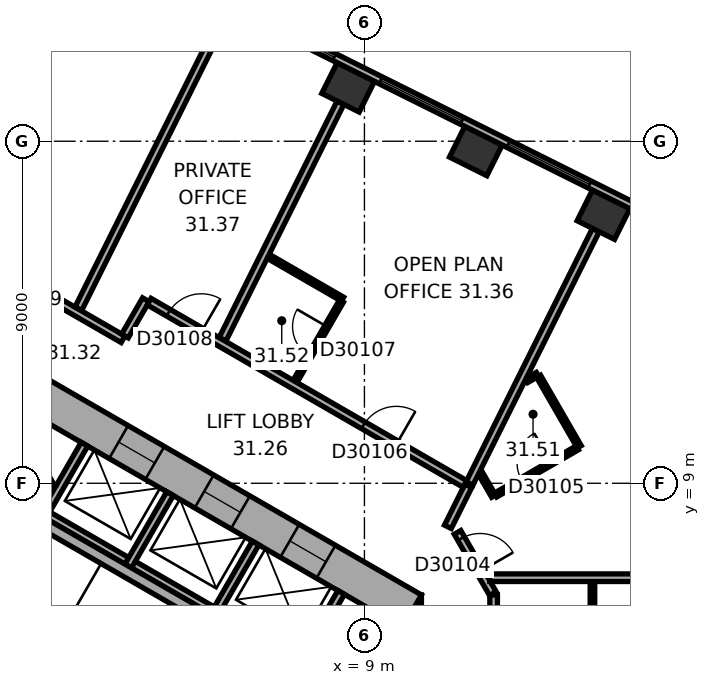
"""IFC4 building model, lengths in metres.
Left out: names, types, materials, properties, quantities, classifications, styles, units other than length and angle.
Written with IfcOpenShell. Run it as: python <this file> out.ifc"""

import sys

from ifc_helpers import new_model, si_unit, direction, frame, frame_2d, origin, origin_2d, place, context, subcontext, project, spatial, rectangle, extrude, element, fill, save


model = new_model("IFC4")
c1 = context("Model", 3, precision=1e-05, world=origin(), true_north=direction((0.0, 1.0)))
c2 = subcontext(c1, "Body", "Model", "MODEL_VIEW")
j1 = project(units=[si_unit("LENGTHUNIT", "METRE"), si_unit("PLANEANGLEUNIT", "RADIAN")], contexts=[c1])
p1 = place(None, origin())
s1 = spatial("IfcSite", under=j1, at=p1, CompositionType="ELEMENT")
p2 = place(p1, origin())
s2 = spatial("IfcBuilding", under=s1, at=p2, CompositionType="ELEMENT")
p3 = place(p2, frame((0.0, 0.0, 128.1)))
s3 = spatial("IfcBuildingStorey", under=s2, at=p3, CompositionType="ELEMENT", Elevation=128.1)
for number, where, z_axis, x_axis in (
    (1, (15.29, 16.065, 0.0), (0.0, 0.0, 1.0), (-0.895, 0.446, 0.0)),
    (2, (11.931, 17.74, 0.0), (0.0, 0.0, 1.0), (-0.895, 0.446, 0.0)),
    (3, (8.571, 19.416, 0.0), (0.0, 0.0, 1.0), (-0.895, 0.446, 0.0)),
):
    element("IfcColumn", number, at=place(p3, frame(where, z_axis=z_axis, x_axis=x_axis)), inside=s3, PredefinedType="COLUMN", context=c2, shape_type="SweptSolid", body=[
        extrude(rectangle(XDim=1.1, YDim=0.9, at=origin_2d()), origin(), (0.0, 0.0, 1.0), 3.7),
    ])
p4 = place(p3, frame((10.0, -6.062, 0.0), z_axis=(0.0, 0.0, 1.0), x_axis=(0.0, 1.0, 0.0)))
e4 = element("IfcWall", 4, at=p4, inside=s3, PredefinedType="SHEAR", context=c2, shape_type="SweptSolid", body=[
    extrude(rectangle(XDim=12.125, YDim=1.0, at=frame_2d((6.062, 0.0))), origin(), (0.0, 0.0, 1.0), 3.7),
])
p5 = place(p4, frame((6.262, 0.0, 0.0)))
e5 = element("IfcOpeningElement", 5, at=p5, cuts=e4, PredefinedType="OPENING", context=c2, shape_type="SweptSolid", body=[
    extrude(rectangle(XDim=1.5, YDim=2.1, at=frame_2d((0.75, 1.05))), frame((0.0, 0.51, 0.0), z_axis=(0.0, -1.0, 0.0), x_axis=(1.0, 0.0, 0.0)), (0.0, 0.0, 1.0), 1.02),
])
p6 = place(p4, frame((1.712, 0.0, 0.0)))
e6 = element("IfcOpeningElement", 6, at=p6, cuts=e4, PredefinedType="OPENING", context=c2, shape_type="SweptSolid", body=[
    extrude(rectangle(XDim=1.1, YDim=2.1, at=frame_2d((0.55, 1.05))), frame((0.0, 0.51, 0.0), z_axis=(0.0, -1.0, 0.0), x_axis=(1.0, 0.0, 0.0)), (0.0, 0.0, 1.0), 1.02),
])
p7 = place(p4, frame((4.312, 0.0, 0.0)))
e7 = element("IfcOpeningElement", 7, at=p7, cuts=e4, PredefinedType="OPENING", context=c2, shape_type="SweptSolid", body=[
    extrude(rectangle(XDim=1.1, YDim=2.1, at=frame_2d((0.55, 1.05))), frame((0.0, 0.51, 0.0), z_axis=(0.0, -1.0, 0.0), x_axis=(1.0, 0.0, 0.0)), (0.0, 0.0, 1.0), 1.02),
])
p8 = place(p3, frame((10.25, 5.629, 0.0), z_axis=(0.0, 0.0, 1.0), x_axis=(-0.866022616891, 0.50000482701, 0.0)))
e8 = element("IfcWall", 8, at=p8, inside=s3, PredefinedType="SHEAR", context=c2, shape_type="SweptSolid", body=[
    extrude(rectangle(XDim=12.125, YDim=1.0, at=frame_2d((6.062, 0.0))), origin(), (0.0, 0.0, 1.0), 3.7),
])
p9 = place(p8, frame((2.612, 0.0, 0.0)))
e9 = element("IfcOpeningElement", 9, at=p9, cuts=e8, PredefinedType="OPENING", context=c2, shape_type="SweptSolid", body=[
    extrude(rectangle(XDim=1.1, YDim=2.1, at=frame_2d((0.55, 1.05))), frame((0.0, 0.51, 0.0), z_axis=(0.0, -1.0, 0.0), x_axis=(1.0, 0.0, 0.0)), (0.0, 0.0, 1.0), 1.02),
])
p10 = place(p8, frame((5.212, 0.0, 0.0)))
e10 = element("IfcOpeningElement", 10, at=p10, cuts=e8, PredefinedType="OPENING", context=c2, shape_type="SweptSolid", body=[
    extrude(rectangle(XDim=1.1, YDim=2.1, at=frame_2d((0.55, 1.05))), frame((0.0, 0.51, 0.0), z_axis=(0.0, -1.0, 0.0), x_axis=(1.0, 0.0, 0.0)), (0.0, 0.0, 1.0), 1.02),
])
p11 = place(p8, frame((7.812, 0.0, 0.0)))
e11 = element("IfcOpeningElement", 11, at=p11, cuts=e8, PredefinedType="OPENING", context=c2, shape_type="SweptSolid", body=[
    extrude(rectangle(XDim=1.1, YDim=2.1, at=frame_2d((0.55, 1.05))), frame((0.0, 0.51, 0.0), z_axis=(0.0, -1.0, 0.0), x_axis=(1.0, 0.0, 0.0)), (0.0, 0.0, 1.0), 1.02),
])
p12 = place(p3, frame((19.464, 14.599, 0.0), z_axis=(0.0, 0.0, 1.0), x_axis=(-0.894935755043, 0.446195018289, 0.0)))
e12 = element("IfcWall", 12, at=p12, inside=s3, PredefinedType="STANDARD", context=c2, shape_type="SweptSolid", body=[
    extrude(rectangle(XDim=20.044, YDim=0.2, at=frame_2d((10.022, 0.0))), origin(), (0.0, 0.0, 1.0), 3.7),
])
p13 = place(p12, frame((1.313, 0.0, 0.9)))
e13 = element("IfcOpeningElement", 13, at=p13, cuts=e12, PredefinedType="OPENING", context=c2, shape_type="SweptSolid", body=[
    extrude(rectangle(XDim=2.4, YDim=2.0, at=frame_2d((1.2, 1.0))), frame((0.0, 0.11, 0.0), z_axis=(0.0, -1.0, 0.0), x_axis=(1.0, 0.0, 0.0)), (0.0, 0.0, 1.0), 0.22),
])
p14 = place(p12, frame((5.067, 0.0, 0.9)))
e14 = element("IfcOpeningElement", 14, at=p14, cuts=e12, PredefinedType="OPENING", context=c2, shape_type="SweptSolid", body=[
    extrude(rectangle(XDim=2.4, YDim=2.0, at=frame_2d((1.2, 1.0))), frame((0.0, 0.11, 0.0), z_axis=(0.0, -1.0, 0.0), x_axis=(1.0, 0.0, 0.0)), (0.0, 0.0, 1.0), 0.22),
])
p15 = place(p12, frame((8.821, 0.0, 0.9)))
e15 = element("IfcOpeningElement", 15, at=p15, cuts=e12, PredefinedType="OPENING", context=c2, shape_type="SweptSolid", body=[
    extrude(rectangle(XDim=2.4, YDim=2.0, at=frame_2d((1.2, 1.0))), frame((0.0, 0.11, 0.0), z_axis=(0.0, -1.0, 0.0), x_axis=(1.0, 0.0, 0.0)), (0.0, 0.0, 1.0), 0.22),
])
p16 = place(p12, frame((12.575, 0.0, 0.9)))
e16 = element("IfcOpeningElement", 16, at=p16, cuts=e12, PredefinedType="OPENING", context=c2, shape_type="SweptSolid", body=[
    extrude(rectangle(XDim=2.4, YDim=2.0, at=frame_2d((1.2, 1.0))), frame((0.0, 0.11, 0.0), z_axis=(0.0, -1.0, 0.0), x_axis=(1.0, 0.0, 0.0)), (0.0, 0.0, 1.0), 0.22),
])
p17 = place(p12, frame((16.329, 0.0, 0.9)))
e17 = element("IfcOpeningElement", 17, at=p17, cuts=e12, PredefinedType="OPENING", context=c2, shape_type="SweptSolid", body=[
    extrude(rectangle(XDim=2.4, YDim=2.0, at=frame_2d((1.2, 1.0))), frame((0.0, 0.11, 0.0), z_axis=(0.0, -1.0, 0.0), x_axis=(1.0, 0.0, 0.0)), (0.0, 0.0, 1.0), 0.22),
])
p18 = place(p3, frame((7.424, 4.259, 0.0), z_axis=(0.0, 0.0, 1.0), x_axis=(-0.866026010844, 0.49999894854, 0.0)))
e18 = element("IfcWall", 18, at=p18, inside=s3, PredefinedType="PARTITIONING", context=c2, shape_type="SweptSolid", body=[
    extrude(rectangle(XDim=8.0, YDim=0.2, at=frame_2d((4.0, 0.0))), origin(), (0.0, 0.0, 1.0), 3.42),
])
for number, where, z_axis, x_axis in (
    (19, (7.287, 4.222, 0.0), (0.0, 0.0, 1.0), (0.5, 0.866, 0.0)),
    (20, (5.036, 5.522, 0.0), (0.0, 0.0, 1.0), (0.5, 0.866, 0.0)),
    (21, (2.784, 6.822, 0.0), (0.0, 0.0, 1.0), (0.5, 0.866, 0.0)),
    (22, (0.532, 8.122, 0.0), (0.0, 0.0, 1.0), (0.5, 0.866, 0.0)),
):
    element("IfcWall", number, at=place(p3, frame(where, z_axis=z_axis, x_axis=x_axis)), inside=s3, PredefinedType="PARTITIONING", context=c2, shape_type="SweptSolid", body=[
        extrude(rectangle(XDim=2.2, YDim=0.2, at=frame_2d((1.1, 0.0))), origin(), (0.0, 0.0, 1.0), 3.42),
    ])
p19 = place(p3, frame((0.803, 9.009, 0.0), z_axis=(0.0, 0.0, 1.0), x_axis=(-0.866028230842, -0.499995103361, 0.0)))
e23 = element("IfcWall", 23, at=p19, inside=s3, PredefinedType="PARTITIONING", context=c2, shape_type="SweptSolid", body=[
    extrude(rectangle(XDim=5.4, YDim=0.2, at=frame_2d((2.7, 0.0))), origin(), (0.0, 0.0, 1.0), 3.42),
])
p20 = place(p3, frame((0.767, 8.872, 0.0), z_axis=(0.0, 0.0, 1.0), x_axis=(-0.499994660107, 0.866028486751, 0.0)))
e24 = element("IfcWall", 24, at=p20, inside=s3, PredefinedType="PARTITIONING", context=c2, shape_type="SweptSolid", body=[
    extrude(rectangle(XDim=2.2, YDim=0.2, at=frame_2d((1.1, 0.0))), origin(), (0.0, 0.0, 1.0), 3.42),
])
p21 = place(p3, frame((6.303, 4.617, 0.0), z_axis=(0.0, 0.0, 1.0), x_axis=(-0.866027801685, 0.499995846692, 0.0)))
e25 = element("IfcWall", 25, at=p21, inside=s3, PredefinedType="SHEAR", context=c2, shape_type="SweptSolid", body=[
    extrude(rectangle(XDim=7.06, YDim=0.3, at=frame_2d((3.53, 0.0))), origin(), (0.0, 0.0, 1.0), 3.42),
])
p22 = place(p3, frame((0.95, 13.77, 0.0), z_axis=(0.0, 0.0, 1.0), x_axis=(-1.0, 0.0, 0.0)))
e26 = element("IfcWall", 26, at=p22, inside=s3, PredefinedType="PARTITIONING", context=c2, shape_type="SweptSolid", body=[
    extrude(rectangle(XDim=1.86, YDim=0.2, at=frame_2d((0.93, 0.0))), origin(), (0.0, 0.0, 1.0), 3.42),
])
p23 = place(p22, frame((0.43, 0.0, 0.0)))
e27 = element("IfcOpeningElement", 27, at=p23, cuts=e26, PredefinedType="OPENING", context=c2, shape_type="SweptSolid", body=[
    extrude(rectangle(XDim=1.0, YDim=2.1, at=frame_2d((0.5, 1.05))), frame((0.0, 0.11, 0.0), z_axis=(0.0, -1.0, 0.0), x_axis=(1.0, 0.0, 0.0)), (0.0, 0.0, 1.0), 0.22),
])
p24 = place(p3, frame((2.648, 12.789, 0.0), z_axis=(0.0, 0.0, 1.0), x_axis=(-0.8660607342, 0.499938800931, 0.0)))
e28 = element("IfcWall", 28, at=p24, inside=s3, PredefinedType="PARTITIONING", context=c2, shape_type="SweptSolid", body=[
    extrude(rectangle(XDim=1.921, YDim=0.2, at=frame_2d((0.96, 0.0))), origin(), (0.0, 0.0, 1.0), 3.42),
])
p25 = place(p3, frame((3.249, 13.829, 0.0), z_axis=(0.0, 0.0, 1.0), x_axis=(-0.499812034598, -0.866133898465, 0.0)))
e29 = element("IfcWall", 29, at=p25, inside=s3, PredefinedType="PARTITIONING", context=c2, shape_type="SweptSolid", body=[
    extrude(rectangle(XDim=1.101, YDim=0.2, at=frame_2d((0.551, 0.0))), origin(), (0.0, 0.0, 1.0), 3.42),
])
p26 = place(p3, frame((5.01, 20.688, 0.0), z_axis=(0.0, 0.0, 1.0), x_axis=(-0.446203062394, -0.894931744386, 0.0)))
e30 = element("IfcWall", 30, at=p26, inside=s3, PredefinedType="PARTITIONING", context=c2, shape_type="SweptSolid", body=[
    extrude(rectangle(XDim=7.927, YDim=0.2, at=frame_2d((3.963, 0.0))), origin(), (0.0, 0.0, 1.0), 2.87),
])
p27 = place(p3, frame((6.468, 14.973, 0.0), z_axis=(0.0, 0.0, 1.0), x_axis=(0.865993004593, -0.500056112848, 0.0)))
e31 = element("IfcWall", 31, at=p27, inside=s3, PredefinedType="PARTITIONING", context=c2, shape_type="SweptSolid", body=[
    extrude(rectangle(XDim=2.259, YDim=0.12, at=frame_2d((1.129, 0.0))), origin(), (0.0, 0.0, 1.0), 3.42),
])
p28 = place(p3, frame((8.37, 19.013, 0.0), z_axis=(0.0, 0.0, 1.0), x_axis=(-0.446187985757, -0.894939261272, 0.0)))
e32 = element("IfcWall", 32, at=p28, inside=s3, PredefinedType="PARTITIONING", context=c2, shape_type="SweptSolid", body=[
    extrude(rectangle(XDim=6.953, YDim=0.2, at=frame_2d((3.477, 0.0))), origin(), (0.0, 0.0, 1.0), 3.42),
])
p29 = place(p3, frame((8.394, 13.792, 0.0), z_axis=(0.0, 0.0, 1.0), x_axis=(-0.500002508028, -0.866023955769, 0.0)))
e33 = element("IfcWall", 33, at=p29, inside=s3, PredefinedType="PARTITIONING", context=c2, shape_type="SweptSolid", body=[
    extrude(rectangle(XDim=2.44, YDim=0.12, at=frame_2d((1.22, 0.0))), origin(), (0.0, 0.0, 1.0), 3.42),
])
p30 = place(p29, frame((0.77, 0.0, 0.0)))
e34 = element("IfcOpeningElement", 34, at=p30, cuts=e33, PredefinedType="OPENING", context=c2, shape_type="SweptSolid", body=[
    extrude(rectangle(XDim=0.9, YDim=2.1, at=frame_2d((0.45, 1.05))), frame((0.0, 0.07, 0.0), z_axis=(0.0, -1.0, 0.0), x_axis=(1.0, 0.0, 0.0)), (0.0, 0.0, 1.0), 0.14),
])
p31 = place(p3, frame((11.196, 7.854, 0.0), z_axis=(0.0, 0.0, 1.0), x_axis=(0.446241040303, 0.894912808015, 0.0)))
e35 = element("IfcWall", 35, at=p31, inside=s3, PredefinedType="PARTITIONING", context=c2, shape_type="SweptSolid", body=[
    extrude(rectangle(XDim=1.205, YDim=0.2, at=frame_2d((0.603, 0.0))), origin(), (0.0, 0.0, 1.0), 3.42),
])
p32 = place(p3, frame((11.646, 8.981, 0.0), z_axis=(0.0, 0.0, 1.0), x_axis=(-0.866027142779, 0.499996987961, 0.0)))
e36 = element("IfcWall", 36, at=p32, inside=s3, PredefinedType="PARTITIONING", context=c2, shape_type="SweptSolid", body=[
    extrude(rectangle(XDim=9.597, YDim=0.2, at=frame_2d((4.798, 0.0))), origin(), (0.0, 0.0, 1.0), 3.42),
])
p33 = place(p32, frame((2.086, 0.0, 0.0)))
e37 = element("IfcOpeningElement", 37, at=p33, cuts=e36, PredefinedType="OPENING", context=c2, shape_type="SweptSolid", body=[
    extrude(rectangle(XDim=1.0, YDim=2.1, at=frame_2d((0.5, 1.05))), frame((0.0, 0.11, 0.0), z_axis=(0.0, -1.0, 0.0), x_axis=(1.0, 0.0, 0.0)), (0.0, 0.0, 1.0), 0.22),
])
p34 = place(p32, frame((8.01, 0.0, 0.0)))
e38 = element("IfcOpeningElement", 38, at=p34, cuts=e36, PredefinedType="OPENING", context=c2, shape_type="SweptSolid", body=[
    extrude(rectangle(XDim=1.0, YDim=2.1, at=frame_2d((0.5, 1.05))), frame((0.0, 0.11, 0.0), z_axis=(0.0, -1.0, 0.0), x_axis=(1.0, 0.0, 0.0)), (0.0, 0.0, 1.0), 0.22),
])
p35 = place(p3, frame((12.38, 6.097, 0.0), z_axis=(0.0, 0.0, 1.0), x_axis=(-0.499964847546, 0.866045698112, 0.0)))
e39 = element("IfcWall", 39, at=p35, inside=s3, PredefinedType="PARTITIONING", context=c2, shape_type="SweptSolid", body=[
    extrude(rectangle(XDim=1.86, YDim=0.2, at=frame_2d((0.93, 0.0))), origin(), (0.0, 0.0, 1.0), 3.42),
])
p36 = place(p35, frame((0.672, 0.0, 0.0)))
e40 = element("IfcOpeningElement", 40, at=p36, cuts=e39, PredefinedType="OPENING", context=c2, shape_type="SweptSolid", body=[
    extrude(rectangle(XDim=1.0, YDim=2.1, at=frame_2d((0.5, 1.05))), frame((0.0, 0.11, 0.0), z_axis=(0.0, -1.0, 0.0), x_axis=(1.0, 0.0, 0.0)), (0.0, 0.0, 1.0), 0.22),
])
p37 = place(p3, frame((12.4, 0.201, 0.0), z_axis=(0.0, 0.0, 1.0), x_axis=(0.0, 1.0, 0.0)))
e41 = element("IfcWall", 41, at=p37, inside=s3, PredefinedType="PARTITIONING", context=c2, shape_type="SweptSolid", body=[
    extrude(rectangle(XDim=5.861, YDim=0.2, at=frame_2d((2.931, 0.0))), origin(), (0.0, 0.0, 1.0), 3.42),
])
p38 = place(p37, frame((1.306, 0.0, 0.0)))
e42 = element("IfcOpeningElement", 42, at=p38, cuts=e41, PredefinedType="OPENING", context=c2, shape_type="SweptSolid", body=[
    extrude(rectangle(XDim=1.0, YDim=2.1, at=frame_2d((0.5, 1.05))), frame((0.0, 0.11, 0.0), z_axis=(0.0, -1.0, 0.0), x_axis=(1.0, 0.0, 0.0)), (0.0, 0.0, 1.0), 0.22),
])
p39 = place(p3, frame((12.401, 8.661, 0.0), z_axis=(0.0, 0.0, 1.0), x_axis=(-0.499831418649, 0.866122712398, 0.0)))
e43 = element("IfcWall", 43, at=p39, inside=s3, PredefinedType="PARTITIONING", context=c2, shape_type="SweptSolid", body=[
    extrude(rectangle(XDim=0.711, YDim=0.12, at=frame_2d((0.355, 0.0))), origin(), (0.0, 0.0, 1.0), 3.42),
])
p40 = place(p3, frame((13.269, 11.702, 0.0), z_axis=(0.0, 0.0, 1.0), x_axis=(0.865936922628, 0.500153222552, 0.0)))
e44 = element("IfcWall", 44, at=p40, inside=s3, PredefinedType="PARTITIONING", context=c2, shape_type="SweptSolid", body=[
    extrude(rectangle(XDim=0.327, YDim=0.12, at=frame_2d((0.164, 0.0))), origin(), (0.0, 0.0, 1.0), 3.42),
])
p41 = place(p3, frame((13.583, 11.814, 0.0), z_axis=(0.0, 0.0, 1.0), x_axis=(0.500028586798, -0.86600889856, 0.0)))
e45 = element("IfcWall", 45, at=p41, inside=s3, PredefinedType="PARTITIONING", context=c2, shape_type="SweptSolid", body=[
    extrude(rectangle(XDim=2.14, YDim=0.12, at=frame_2d((1.07, 0.0))), origin(), (0.0, 0.0, 1.0), 3.42),
])
p42 = place(p3, frame((14.601, 9.931, 0.0), z_axis=(0.0, 0.0, 1.0), x_axis=(-0.866023285932, -0.50000366821, 0.0)))
e46 = element("IfcWall", 46, at=p42, inside=s3, PredefinedType="PARTITIONING", context=c2, shape_type="SweptSolid", body=[
    extrude(rectangle(XDim=2.48, YDim=0.12, at=frame_2d((1.24, 0.0))), origin(), (0.0, 0.0, 1.0), 3.42),
])
p43 = place(p42, frame((0.79, 0.0, 0.0)))
e47 = element("IfcOpeningElement", 47, at=p43, cuts=e46, PredefinedType="OPENING", context=c2, shape_type="SweptSolid", body=[
    extrude(rectangle(XDim=0.9, YDim=2.1, at=frame_2d((0.45, 1.05))), frame((0.0, 0.07, 0.0), z_axis=(0.0, -1.0, 0.0), x_axis=(1.0, 0.0, 0.0)), (0.0, 0.0, 1.0), 0.14),
])
p44 = place(p3, frame((15.0, 6.415, 0.0), z_axis=(0.0, 0.0, 1.0), x_axis=(0.0, -1.0, 0.0)))
e48 = element("IfcWall", 48, at=p44, inside=s3, PredefinedType="PARTITIONING", context=c2, shape_type="SweptSolid", body=[
    extrude(rectangle(XDim=2.493, YDim=0.12, at=frame_2d((1.247, 0.0))), origin(), (0.0, 0.0, 1.0), 3.42),
])
p45 = place(p3, frame((15.09, 15.663, 0.0), z_axis=(0.0, 0.0, 1.0), x_axis=(-0.446203977428, -0.89493128816, 0.0)))
e49 = element("IfcWall", 49, at=p45, inside=s3, PredefinedType="PARTITIONING", context=c2, shape_type="SweptSolid", body=[
    extrude(rectangle(XDim=7.45, YDim=0.2, at=frame_2d((3.725, 0.0))), origin(), (0.0, 0.0, 1.0), 3.42),
])
p46 = place(p3, frame((20.75, 6.515, 0.0), z_axis=(0.0, 0.0, 1.0), x_axis=(-1.0, 0.0, 0.0)))
e50 = element("IfcWall", 50, at=p46, inside=s3, PredefinedType="PARTITIONING", context=c2, shape_type="SweptSolid", body=[
    extrude(rectangle(XDim=8.452, YDim=0.2, at=frame_2d((4.226, 0.0))), origin(), (0.0, 0.0, 1.0), 3.42),
])
p47 = place(p14, origin())
e51 = element("IfcWindow", 51, at=p47, inside=s3, PartitioningType="SINGLE_PANEL", PredefinedType="WINDOW", context=c2, shape_type="SweptSolid", body=[
    extrude(rectangle(XDim=2.4, YDim=2.0, at=frame_2d((1.2, 1.0))), frame((0.0, 0.03, 0.0), z_axis=(0.0, -1.0, 0.0), x_axis=(1.0, 0.0, 0.0)), (0.0, 0.0, 1.0), 0.06),
])
fill(e14, e51)
p48 = place(p15, origin())
e52 = element("IfcWindow", 52, at=p48, inside=s3, PartitioningType="SINGLE_PANEL", PredefinedType="WINDOW", context=c2, shape_type="SweptSolid", body=[
    extrude(rectangle(XDim=2.4, YDim=2.0, at=frame_2d((1.2, 1.0))), frame((0.0, 0.03, 0.0), z_axis=(0.0, -1.0, 0.0), x_axis=(1.0, 0.0, 0.0)), (0.0, 0.0, 1.0), 0.06),
])
fill(e15, e52)
p49 = place(p16, origin())
e53 = element("IfcWindow", 53, at=p49, inside=s3, PartitioningType="SINGLE_PANEL", PredefinedType="WINDOW", context=c2, shape_type="SweptSolid", body=[
    extrude(rectangle(XDim=2.4, YDim=2.0, at=frame_2d((1.2, 1.0))), frame((0.0, 0.03, 0.0), z_axis=(0.0, -1.0, 0.0), x_axis=(1.0, 0.0, 0.0)), (0.0, 0.0, 1.0), 0.06),
])
fill(e16, e53)
p50 = place(p9, origin())
e54 = element("IfcDoor", 54, at=p50, inside=s3, OperationType="DOUBLE_DOOR_SLIDING", PredefinedType="DOOR", context=c2, shape_type="SweptSolid", body=[
    extrude(rectangle(XDim=1.1, YDim=2.1, at=frame_2d((0.55, 1.05))), frame((0.0, 0.025, 0.0), z_axis=(0.0, -1.0, 0.0), x_axis=(1.0, 0.0, 0.0)), (0.0, 0.0, 1.0), 0.05),
])
fill(e9, e54)
p51 = place(p10, origin())
e55 = element("IfcDoor", 55, at=p51, inside=s3, OperationType="DOUBLE_DOOR_SLIDING", PredefinedType="DOOR", context=c2, shape_type="SweptSolid", body=[
    extrude(rectangle(XDim=1.1, YDim=2.1, at=frame_2d((0.55, 1.05))), frame((0.0, 0.025, 0.0), z_axis=(0.0, -1.0, 0.0), x_axis=(1.0, 0.0, 0.0)), (0.0, 0.0, 1.0), 0.05),
])
fill(e10, e55)
p52 = place(p11, origin())
e56 = element("IfcDoor", 56, at=p52, inside=s3, OperationType="DOUBLE_DOOR_SLIDING", PredefinedType="DOOR", context=c2, shape_type="SweptSolid", body=[
    extrude(rectangle(XDim=1.1, YDim=2.1, at=frame_2d((0.55, 1.05))), frame((0.0, 0.025, 0.0), z_axis=(0.0, -1.0, 0.0), x_axis=(1.0, 0.0, 0.0)), (0.0, 0.0, 1.0), 0.05),
])
fill(e11, e56)
p53 = place(p36, origin())
e57 = element("IfcDoor", 57, at=p53, inside=s3, OperationType="SINGLE_SWING_LEFT", PredefinedType="DOOR", context=c2, shape_type="SweptSolid", body=[
    extrude(rectangle(XDim=1.0, YDim=2.1, at=frame_2d((0.5, 1.05))), frame((0.0, 0.025, 0.0), z_axis=(0.0, -1.0, 0.0), x_axis=(1.0, 0.0, 0.0)), (0.0, 0.0, 1.0), 0.05),
])
fill(e40, e57)
p54 = place(p43, origin())
e58 = element("IfcDoor", 58, at=p54, inside=s3, OperationType="SINGLE_SWING_LEFT", PredefinedType="DOOR", context=c2, shape_type="SweptSolid", body=[
    extrude(rectangle(XDim=0.9, YDim=2.1, at=frame_2d((0.45, 1.05))), frame((0.0, 0.025, 0.0), z_axis=(0.0, -1.0, 0.0), x_axis=(1.0, 0.0, 0.0)), (0.0, 0.0, 1.0), 0.05),
])
fill(e47, e58)
p55 = place(p33, origin())
e59 = element("IfcDoor", 59, at=p55, inside=s3, OperationType="SINGLE_SWING_LEFT", PredefinedType="DOOR", context=c2, shape_type="SweptSolid", body=[
    extrude(rectangle(XDim=1.0, YDim=2.1, at=frame_2d((0.5, 1.05))), frame((0.0, 0.025, 0.0), z_axis=(0.0, -1.0, 0.0), x_axis=(1.0, 0.0, 0.0)), (0.0, 0.0, 1.0), 0.05),
])
fill(e37, e59)
p56 = place(p30, origin())
e60 = element("IfcDoor", 60, at=p56, inside=s3, OperationType="SINGLE_SWING_LEFT", PredefinedType="DOOR", context=c2, shape_type="SweptSolid", body=[
    extrude(rectangle(XDim=0.9, YDim=2.1, at=frame_2d((0.45, 1.05))), frame((0.0, 0.025, 0.0), z_axis=(0.0, -1.0, 0.0), x_axis=(1.0, 0.0, 0.0)), (0.0, 0.0, 1.0), 0.05),
])
fill(e34, e60)
p57 = place(p34, origin())
e61 = element("IfcDoor", 61, at=p57, inside=s3, OperationType="SINGLE_SWING_LEFT", PredefinedType="DOOR", context=c2, shape_type="SweptSolid", body=[
    extrude(rectangle(XDim=1.0, YDim=2.1, at=frame_2d((0.5, 1.05))), frame((0.0, 0.025, 0.0), z_axis=(0.0, -1.0, 0.0), x_axis=(1.0, 0.0, 0.0)), (0.0, 0.0, 1.0), 0.05),
])
fill(e38, e61)
save(model, sys.argv[1])
